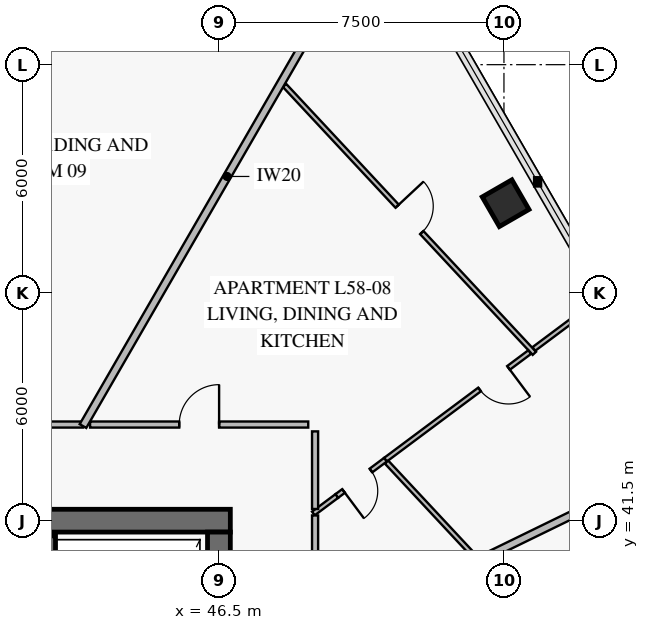
"""IFC4 building model, lengths in metres.
Left out: names, types, materials, properties, quantities, classifications, styles, units other than length and angle.
Written with IfcOpenShell. Run it as: python <this file> out.ifc"""

import sys

from ifc_helpers import new_model, si_unit, direction, frame, frame_2d, origin, origin_2d, place, context, subcontext, project, spatial, rectangle, extrude, element, fill, save


model = new_model("IFC4")
c1 = context("Model", 3, precision=1e-05, world=origin(), true_north=direction((0.0, 1.0)))
c2 = subcontext(c1, "Body", "Model", "MODEL_VIEW")
j1 = project(units=[si_unit("LENGTHUNIT", "METRE"), si_unit("PLANEANGLEUNIT", "RADIAN")], contexts=[c1])
p1 = place(None, origin())
s1 = spatial("IfcSite", under=j1, at=p1, CompositionType="ELEMENT")
p2 = place(p1, origin())
s2 = spatial("IfcBuilding", under=s1, at=p2, CompositionType="ELEMENT")
p3 = place(p2, frame((0.0, 0.0, 231.2)))
s3 = spatial("IfcBuildingStorey", under=s2, at=p3, CompositionType="ELEMENT", Elevation=231.2)
p4 = place(p3, frame((46.8, 41.5, 0.0), z_axis=(0.0, 0.0, 1.0), x_axis=(-1.0, 0.0, 0.0)))
e1 = element("IfcWall", 1, at=p4, inside=s3, PredefinedType="SHEAR", context=c2, shape_type="SweptSolid", body=[
    extrude(rectangle(XDim=7.85, YDim=0.6, at=frame_2d((3.925, 0.0))), origin(), (0.0, 0.0, 1.0), 3.8),
])
p5 = place(p3, frame((46.5, 22.8, 0.0), z_axis=(0.0, 0.0, 1.0), x_axis=(0.0, 1.0, 0.0)))
e2 = element("IfcWall", 2, at=p5, inside=s3, PredefinedType="SHEAR", context=c2, shape_type="SweptSolid", body=[
    extrude(rectangle(XDim=18.4, YDim=0.6, at=frame_2d((9.2, 0.0))), origin(), (0.0, 0.0, 1.0), 3.8),
])
p6 = place(p5, frame((8.95, 0.0, 0.0)))
e3 = element("IfcOpeningElement", 3, at=p6, cuts=e2, PredefinedType="OPENING", context=c2, shape_type="SweptSolid", body=[
    extrude(rectangle(XDim=1.1, YDim=2.15, at=frame_2d((0.55, 1.075))), frame((0.0, 0.312, 0.0), z_axis=(0.0, -1.0, 0.0), x_axis=(1.0, 0.0, 0.0)), (0.0, 0.0, 1.0), 0.624),
])
p7 = place(p3, frame((54.044, 49.855, 0.0), z_axis=(0.0, 0.0, 1.0), x_axis=(-0.5, 0.866025403784, 0.0)))
e4 = element("IfcColumn", 4, at=p7, inside=s3, PredefinedType="COLUMN", context=c2, shape_type="SweptSolid", body=[
    extrude(rectangle(XDim=0.9, YDim=0.9, at=origin_2d()), origin(), (0.0, 0.0, 1.0), 3.55),
])
p8 = place(p3, frame((42.075, 31.4, 0.0), z_axis=(0.0, 0.0, 1.0), x_axis=(0.0, 1.0, 0.0)))
e5 = element("IfcWall", 5, at=p8, inside=s3, PredefinedType="SOLIDWALL", context=c2, shape_type="SweptSolid", body=[
    extrude(rectangle(XDim=9.7, YDim=0.25, at=frame_2d((4.85, 0.0))), origin(), (0.0, 0.0, 1.0), 3.8),
])
p9 = place(p3, frame((54.8, 45.904, 0.0), z_axis=(0.0, 0.0, 1.0), x_axis=(-0.68198067204, 0.731370195567, 0.0)))
e6 = element("IfcWall", 6, at=p9, inside=s3, PredefinedType="PARTITIONING", context=c2, shape_type="SweptSolid", body=[
    extrude(rectangle(XDim=9.639, YDim=0.12, at=frame_2d((4.82, 0.0))), origin(), (0.0, 0.0, 1.0), 2.95),
])
p10 = place(p9, frame((4.344, 0.0, 0.0)))
e7 = element("IfcOpeningElement", 7, at=p10, cuts=e6, PredefinedType="OPENING", context=c2, shape_type="SweptSolid", body=[
    extrude(rectangle(XDim=0.95, YDim=2.1, at=frame_2d((0.475, 1.05))), frame((0.0, 0.072, 0.0), z_axis=(0.0, -1.0, 0.0), x_axis=(1.0, 0.0, 0.0)), (0.0, 0.0, 1.0), 0.144),
])
p11 = place(p3, frame((49.6, 42.148, 0.0), z_axis=(0.0, 0.0, 1.0), x_axis=(0.801441831829, 0.598072729854, 0.0)))
e8 = element("IfcWall", 8, at=p11, inside=s3, PredefinedType="PARTITIONING", context=c2, shape_type="SweptSolid", body=[
    extrude(rectangle(XDim=1.603, YDim=0.12, at=frame_2d((0.801, 0.0))), origin(), (0.0, 0.0, 1.0), 3.55),
])
p12 = place(p11, frame((0.223, 0.0, 0.0)))
e9 = element("IfcOpeningElement", 9, at=p12, cuts=e8, PredefinedType="OPENING", context=c2, shape_type="SweptSolid", body=[
    extrude(rectangle(XDim=0.9, YDim=2.1, at=frame_2d((0.45, 1.05))), frame((0.0, 0.072, 0.0), z_axis=(0.0, -1.0, 0.0), x_axis=(1.0, 0.0, 0.0)), (0.0, 0.0, 1.0), 0.144),
])
p13 = place(p3, frame((50.885, 43.107, 0.0), z_axis=(0.0, 0.0, 1.0), x_axis=(0.801471130314, 0.598033466684, 0.0)))
e10 = element("IfcWall", 10, at=p13, inside=s3, PredefinedType="PARTITIONING", context=c2, shape_type="SweptSolid", body=[
    extrude(rectangle(XDim=4.732, YDim=0.12, at=frame_2d((2.366, 0.0))), origin(), (0.0, 0.0, 1.0), 3.15),
])
p14 = place(p13, frame((3.087, 0.0, 0.0)))
e11 = element("IfcOpeningElement", 11, at=p14, cuts=e10, PredefinedType="OPENING", context=c2, shape_type="SweptSolid", body=[
    extrude(rectangle(XDim=0.95, YDim=2.1, at=frame_2d((0.475, 1.05))), frame((0.0, 0.072, 0.0), z_axis=(0.0, -1.0, 0.0), x_axis=(1.0, 0.0, 0.0)), (0.0, 0.0, 1.0), 0.144),
])
p15 = place(p3, frame((54.787, 46.018, 0.0), z_axis=(0.0, 0.0, 1.0), x_axis=(0.801420991662, 0.598100655511, 0.0)))
e12 = element("IfcWall", 12, at=p15, inside=s3, PredefinedType="PARTITIONING", context=c2, shape_type="SweptSolid", body=[
    extrude(rectangle(XDim=2.305, YDim=0.12, at=frame_2d((1.153, 0.0))), origin(), (0.0, 0.0, 1.0), 2.93),
])
p16 = place(p3, frame((48.85, 44.03, 0.0), z_axis=(0.0, 0.0, 1.0), x_axis=(-1.0, 0.0, 0.0)))
e13 = element("IfcWall", 13, at=p16, inside=s3, PredefinedType="PARTITIONING", context=c2, shape_type="SweptSolid", body=[
    extrude(rectangle(XDim=5.741, YDim=0.16, at=frame_2d((2.87, 0.0))), origin(), (0.0, 0.0, 1.0), 2.95),
])
p17 = place(p16, frame((2.345, 0.0, 0.0)))
e14 = element("IfcOpeningElement", 14, at=p17, cuts=e13, PredefinedType="OPENING", context=c2, shape_type="SweptSolid", body=[
    extrude(rectangle(XDim=1.05, YDim=2.15, at=frame_2d((0.525, 1.075))), frame((0.0, 0.092, 0.0), z_axis=(0.0, -1.0, 0.0), x_axis=(1.0, 0.0, 0.0)), (0.0, 0.0, 1.0), 0.184),
])
p18 = place(p3, frame((42.922, 44.03, 0.0), z_axis=(0.0, 0.0, 1.0), x_axis=(-1.0, 0.0, 0.0)))
e15 = element("IfcWall", 15, at=p18, inside=s3, PredefinedType="PARTITIONING", context=c2, shape_type="SweptSolid", body=[
    extrude(rectangle(XDim=5.642, YDim=0.16, at=frame_2d((2.821, 0.0))), origin(), (0.0, 0.0, 1.0), 2.95),
])
p19 = place(p18, frame((2.246, 0.0, 0.0)))
e16 = element("IfcOpeningElement", 16, at=p19, cuts=e15, PredefinedType="OPENING", context=c2, shape_type="SweptSolid", body=[
    extrude(rectangle(XDim=1.15, YDim=2.2, at=frame_2d((0.575, 1.1))), frame((0.0, 0.092, 0.0), z_axis=(0.0, -1.0, 0.0), x_axis=(1.0, 0.0, 0.0)), (0.0, 0.0, 1.0), 0.184),
])
p20 = place(p3, frame((48.99, 38.336, 0.0), z_axis=(0.0, 0.0, 1.0), x_axis=(0.898797423647, 0.438364222133, 0.0)))
e17 = element("IfcWall", 17, at=p20, inside=s3, PredefinedType="PARTITIONING", context=c2, shape_type="SweptSolid", body=[
    extrude(rectangle(XDim=11.173, YDim=0.2, at=frame_2d((5.587, 0.0))), origin(), (0.0, 0.0, 1.0), 2.93),
])
p21 = place(p3, frame((48.985, 41.689, 0.0), z_axis=(0.0, 0.0, 1.0), x_axis=(0.801410352198, 0.598114911526, 0.0)))
e18 = element("IfcWall", 18, at=p21, inside=s3, PredefinedType="PARTITIONING", context=c2, shape_type="SweptSolid", body=[
    extrude(rectangle(XDim=0.767, YDim=0.12, at=frame_2d((0.384, 0.0))), origin(), (0.0, 0.0, 1.0), 3.55),
])
p22 = place(p3, frame((53.25, 40.533, 0.0), z_axis=(0.0, 0.0, 1.0), x_axis=(-0.682008737139, 0.731344024701, 0.0)))
e19 = element("IfcWall", 19, at=p22, inside=s3, PredefinedType="PARTITIONING", context=c2, shape_type="SweptSolid", body=[
    extrude(rectangle(XDim=3.429, YDim=0.12, at=frame_2d((1.715, 0.0))), origin(), (0.0, 0.0, 1.0), 3.15),
])
p23 = place(p3, frame((42.922, 43.99, 0.0), z_axis=(0.0, 0.0, 1.0), x_axis=(0.500001103527, 0.866024766662, 0.0)))
e20 = element("IfcWall", 20, at=p23, inside=s3, PredefinedType="PARTITIONING", context=c2, shape_type="SweptSolid", body=[
    extrude(rectangle(XDim=15.168, YDim=0.2, at=frame_2d((7.584, 0.0))), origin(), (0.0, 0.0, 1.0), 2.93),
])
p24 = place(p3, frame((49.03, 41.808, 0.0), z_axis=(0.0, 0.0, 1.0), x_axis=(0.0, 1.0, 0.0)))
e21 = element("IfcWall", 21, at=p24, inside=s3, PredefinedType="PARTITIONING", context=c2, shape_type="SweptSolid", body=[
    extrude(rectangle(XDim=2.042, YDim=0.16, at=frame_2d((1.021, 0.0))), origin(), (0.0, 0.0, 1.0), 3.55),
])
p25 = place(p3, frame((49.03, 38.519, 0.0), z_axis=(0.0, 0.0, 1.0), x_axis=(0.0, 1.0, 0.0)))
e22 = element("IfcWall", 22, at=p25, inside=s3, PredefinedType="PARTITIONING", context=c2, shape_type="SweptSolid", body=[
    extrude(rectangle(XDim=3.119, YDim=0.16, at=frame_2d((1.56, 0.0))), origin(), (0.0, 0.0, 1.0), 3.55),
])
p26 = place(p10, frame((0.95, 0.0, 0.0), z_axis=(0.0, 0.0, 1.0), x_axis=(-1.0, 0.0, 0.0)))
e23 = element("IfcDoor", 23, at=p26, inside=s3, OperationType="SINGLE_SWING_LEFT", PredefinedType="DOOR", context=c2, shape_type="SweptSolid", body=[
    extrude(rectangle(XDim=0.95, YDim=2.1, at=frame_2d((0.475, 1.05))), frame((0.0, 0.025, 0.0), z_axis=(0.0, -1.0, 0.0), x_axis=(1.0, 0.0, 0.0)), (0.0, 0.0, 1.0), 0.05),
])
fill(e7, e23)
p27 = place(p12, frame((0.9, 0.0, 0.0), z_axis=(0.0, 0.0, 1.0), x_axis=(-1.0, 0.0, 0.0)))
e24 = element("IfcDoor", 24, at=p27, inside=s3, OperationType="SINGLE_SWING_RIGHT", PredefinedType="DOOR", context=c2, shape_type="SweptSolid", body=[
    extrude(rectangle(XDim=0.9, YDim=2.1, at=frame_2d((0.45, 1.05))), frame((0.0, 0.025, 0.0), z_axis=(0.0, -1.0, 0.0), x_axis=(1.0, 0.0, 0.0)), (0.0, 0.0, 1.0), 0.05),
])
fill(e9, e24)
p28 = place(p14, frame((0.95, 0.0, 0.0), z_axis=(0.0, 0.0, 1.0), x_axis=(-1.0, 0.0, 0.0)))
e25 = element("IfcDoor", 25, at=p28, inside=s3, OperationType="SINGLE_SWING_LEFT", PredefinedType="DOOR", context=c2, shape_type="SweptSolid", body=[
    extrude(rectangle(XDim=0.95, YDim=2.1, at=frame_2d((0.475, 1.05))), frame((0.0, 0.025, 0.0), z_axis=(0.0, -1.0, 0.0), x_axis=(1.0, 0.0, 0.0)), (0.0, 0.0, 1.0), 0.05),
])
fill(e11, e25)
p29 = place(p17, frame((1.05, 0.0, 0.0), z_axis=(0.0, 0.0, 1.0), x_axis=(-1.0, 0.0, 0.0)))
e26 = element("IfcDoor", 26, at=p29, inside=s3, OperationType="SINGLE_SWING_RIGHT", PredefinedType="DOOR", context=c2, shape_type="SweptSolid", body=[
    extrude(rectangle(XDim=1.05, YDim=2.15, at=frame_2d((0.525, 1.075))), frame((0.0, 0.025, 0.0), z_axis=(0.0, -1.0, 0.0), x_axis=(1.0, 0.0, 0.0)), (0.0, 0.0, 1.0), 0.05),
])
fill(e14, e26)
save(model, sys.argv[1])
